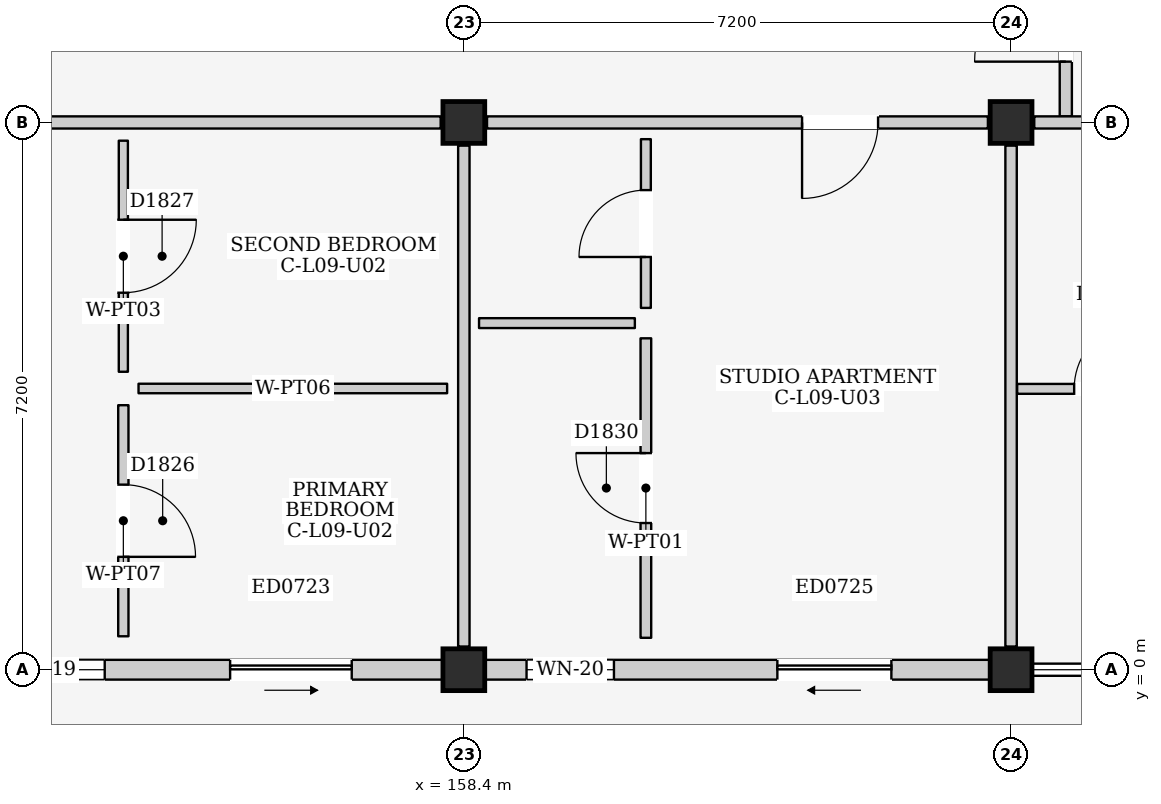
"""IFC4 building model, lengths in metres.
Left out: names, types, materials, properties, quantities, classifications, styles, units other than length and angle.
Written with IfcOpenShell. Run it as: python <this file> out.ifc"""

import sys

from ifc_helpers import new_model, si_unit, direction, frame, frame_2d, origin, origin_2d, place, context, subcontext, project, spatial, rectangle, extrude, element, fill, save


model = new_model("IFC4")
c1 = context("Model", 3, precision=1e-05, world=origin(), true_north=direction((0.0, 1.0)))
c2 = subcontext(c1, "Body", "Model", "MODEL_VIEW")
j1 = project(units=[si_unit("LENGTHUNIT", "METRE"), si_unit("PLANEANGLEUNIT", "RADIAN")], contexts=[c1])
p1 = place(None, origin())
s1 = spatial("IfcSite", under=j1, at=p1, CompositionType="ELEMENT")
p2 = place(p1, origin())
s2 = spatial("IfcBuilding", under=s1, at=p2, CompositionType="ELEMENT")
p3 = place(p2, frame((0.0, 0.0, 31.5)))
s3 = spatial("IfcBuildingStorey", under=s2, at=p3, CompositionType="ELEMENT", Elevation=31.5)
for number, where, z_axis, x_axis in (
    (1, (158.4, 0.0, 0.0), (0.0, 0.0, 1.0), (1.0, 0.0, 0.0)),
    (2, (158.4, 7.2, 0.0), (0.0, 0.0, 1.0), (1.0, 0.0, 0.0)),
    (3, (165.6, 0.0, 0.0), (0.0, 0.0, 1.0), (1.0, 0.0, 0.0)),
    (4, (165.6, 7.2, 0.0), (0.0, 0.0, 1.0), (1.0, 0.0, 0.0)),
):
    element("IfcColumn", number, at=place(p3, frame(where, z_axis=z_axis, x_axis=x_axis)), inside=s3, PredefinedType="COLUMN", context=c2, shape_type="SweptSolid", body=[
        extrude(rectangle(XDim=0.55, YDim=0.55, at=origin_2d()), origin(), (0.0, 0.0, 1.0), 3.3),
    ])
p4 = place(p3, frame((151.475, 0.0, 0.0), z_axis=(0.0, 0.0, 1.0), x_axis=(1.0, 0.0, 0.0)))
e5 = element("IfcWall", 5, at=p4, inside=s3, PredefinedType="ELEMENTEDWALL", context=c2, shape_type="SweptSolid", body=[
    extrude(rectangle(XDim=6.65, YDim=0.26, at=frame_2d((3.325, 0.0))), origin(), (0.0, 0.0, 1.0), 2.615),
])
p5 = place(p4, frame((3.85, 0.0, 0.0)))
e6 = element("IfcOpeningElement", 6, at=p5, cuts=e5, PredefinedType="OPENING", context=c2, shape_type="SweptSolid", body=[
    extrude(rectangle(XDim=1.6, YDim=2.12, at=frame_2d((0.8, 1.06))), frame((0.0, 0.145, 0.0), z_axis=(0.0, -1.0, 0.0), x_axis=(1.0, 0.0, 0.0)), (0.0, 0.0, 1.0), 0.29),
])
p6 = place(p4, frame((0.55, 0.0, 0.9)))
e7 = element("IfcOpeningElement", 7, at=p6, cuts=e5, PredefinedType="OPENING", context=c2, shape_type="SweptSolid", body=[
    extrude(rectangle(XDim=1.65, YDim=1.35, at=frame_2d((0.825, 0.675))), frame((0.0, 0.145, 0.0), z_axis=(0.0, -1.0, 0.0), x_axis=(1.0, 0.0, 0.0)), (0.0, 0.0, 1.0), 0.29),
])
p7 = place(p3, frame((158.675, 0.0, 0.0), z_axis=(0.0, 0.0, 1.0), x_axis=(1.0, 0.0, 0.0)))
e8 = element("IfcWall", 8, at=p7, inside=s3, PredefinedType="ELEMENTEDWALL", context=c2, shape_type="SweptSolid", body=[
    extrude(rectangle(XDim=6.65, YDim=0.26, at=frame_2d((3.325, 0.0))), origin(), (0.0, 0.0, 1.0), 2.615),
])
p8 = place(p7, frame((3.85, 0.0, 0.0)))
e9 = element("IfcOpeningElement", 9, at=p8, cuts=e8, PredefinedType="OPENING", context=c2, shape_type="SweptSolid", body=[
    extrude(rectangle(XDim=1.5, YDim=2.12, at=frame_2d((0.75, 1.06))), frame((0.0, 0.145, 0.0), z_axis=(0.0, -1.0, 0.0), x_axis=(1.0, 0.0, 0.0)), (0.0, 0.0, 1.0), 0.29),
])
p9 = place(p7, frame((0.55, 0.0, 0.9)))
e10 = element("IfcOpeningElement", 10, at=p9, cuts=e8, PredefinedType="OPENING", context=c2, shape_type="SweptSolid", body=[
    extrude(rectangle(XDim=1.15, YDim=1.15, at=frame_2d((0.575, 0.575))), frame((0.0, 0.145, 0.0), z_axis=(0.0, -1.0, 0.0), x_axis=(1.0, 0.0, 0.0)), (0.0, 0.0, 1.0), 0.29),
])
p10 = place(p3, frame((166.32, 7.28, 0.0), z_axis=(0.0, 0.0, 1.0), x_axis=(0.0, 1.0, 0.0)))
e11 = element("IfcWall", 11, at=p10, inside=s3, PredefinedType="PARTITIONING", context=c2, shape_type="SweptSolid", body=[
    extrude(rectangle(XDim=4.32, YDim=0.16, at=frame_2d((2.16, 0.0))), origin(), (0.0, 0.0, 1.0), 3.08),
])
p11 = place(p10, frame((0.72, 0.0, 0.0)))
e12 = element("IfcOpeningElement", 12, at=p11, cuts=e11, PredefinedType="OPENING", context=c2, shape_type="SweptSolid", body=[
    extrude(rectangle(XDim=1.2, YDim=2.2, at=frame_2d((0.6, 1.1))), frame((0.0, 0.095, 0.0), z_axis=(0.0, -1.0, 0.0), x_axis=(1.0, 0.0, 0.0)), (0.0, 0.0, 1.0), 0.19),
])
p12 = place(p3, frame((151.505, 7.2, 0.0), z_axis=(0.0, 0.0, 1.0), x_axis=(1.0, 0.0, 0.0)))
e13 = element("IfcWall", 13, at=p12, inside=s3, PredefinedType="PARTITIONING", context=c2, shape_type="SweptSolid", body=[
    extrude(rectangle(XDim=6.59, YDim=0.16, at=frame_2d((3.295, 0.0))), origin(), (0.0, 0.0, 1.0), 2.465),
])
p13 = place(p12, frame((0.18, 0.0, 0.0)))
e14 = element("IfcOpeningElement", 14, at=p13, cuts=e13, PredefinedType="OPENING", context=c2, shape_type="SweptSolid", body=[
    extrude(rectangle(XDim=1.0, YDim=2.15, at=frame_2d((0.5, 1.075))), frame((0.0, 0.095, 0.0), z_axis=(0.0, -1.0, 0.0), x_axis=(1.0, 0.0, 0.0)), (0.0, 0.0, 1.0), 0.19),
])
p14 = place(p3, frame((158.4, 0.305, 0.0), z_axis=(0.0, 0.0, 1.0), x_axis=(0.0, 1.0, 0.0)))
e15 = element("IfcWall", 15, at=p14, inside=s3, PredefinedType="PARTITIONING", context=c2, shape_type="SweptSolid", body=[
    extrude(rectangle(XDim=6.59, YDim=0.15, at=frame_2d((3.295, 0.0))), origin(), (0.0, 0.0, 1.0), 2.565),
])
p15 = place(p3, frame((153.92, 0.44, 0.0), z_axis=(0.0, 0.0, 1.0), x_axis=(0.0, 1.0, 0.0)))
e16 = element("IfcWall", 16, at=p15, inside=s3, PredefinedType="PARTITIONING", context=c2, shape_type="SweptSolid", body=[
    extrude(rectangle(XDim=3.04, YDim=0.135, at=frame_2d((1.52, 0.0))), origin(), (0.0, 0.0, 1.0), 3.08),
])
p16 = place(p15, frame((1.045, 0.0, 0.0)))
e17 = element("IfcOpeningElement", 17, at=p16, cuts=e16, PredefinedType="OPENING", context=c2, shape_type="SweptSolid", body=[
    extrude(rectangle(XDim=0.95, YDim=2.15, at=frame_2d((0.475, 1.075))), frame((0.0, 0.083, 0.0), z_axis=(0.0, -1.0, 0.0), x_axis=(1.0, 0.0, 0.0)), (0.0, 0.0, 1.0), 0.165),
])
p17 = place(p3, frame((154.12, 3.7, 0.0), z_axis=(0.0, 0.0, 1.0), x_axis=(1.0, 0.0, 0.0)))
e18 = element("IfcWall", 18, at=p17, inside=s3, PredefinedType="PARTITIONING", context=c2, shape_type="SweptSolid", body=[
    extrude(rectangle(XDim=4.06, YDim=0.125, at=frame_2d((2.03, 0.0))), origin(), (0.0, 0.0, 1.0), 3.08),
])
p18 = place(p3, frame((153.92, 3.92, 0.0), z_axis=(0.0, 0.0, 1.0), x_axis=(0.0, 1.0, 0.0)))
e19 = element("IfcWall", 19, at=p18, inside=s3, PredefinedType="PARTITIONING", context=c2, shape_type="SweptSolid", body=[
    extrude(rectangle(XDim=3.04, YDim=0.12, at=frame_2d((1.52, 0.0))), origin(), (0.0, 0.0, 1.0), 3.08),
])
p19 = place(p18, frame((1.04, 0.0, 0.0)))
e20 = element("IfcOpeningElement", 20, at=p19, cuts=e19, PredefinedType="OPENING", context=c2, shape_type="SweptSolid", body=[
    extrude(rectangle(XDim=0.96, YDim=2.15, at=frame_2d((0.48, 1.075))), frame((0.0, 0.075, 0.0), z_axis=(0.0, -1.0, 0.0), x_axis=(1.0, 0.0, 0.0)), (0.0, 0.0, 1.0), 0.15),
])
p20 = place(p3, frame((158.705, 7.2, 0.0), z_axis=(0.0, 0.0, 1.0), x_axis=(1.0, 0.0, 0.0)))
e21 = element("IfcWall", 21, at=p20, inside=s3, PredefinedType="PARTITIONING", context=c2, shape_type="SweptSolid", body=[
    extrude(rectangle(XDim=6.59, YDim=0.16, at=frame_2d((3.295, 0.0))), origin(), (0.0, 0.0, 1.0), 2.465),
])
p21 = place(p20, frame((4.145, 0.0, 0.0)))
e22 = element("IfcOpeningElement", 22, at=p21, cuts=e21, PredefinedType="OPENING", context=c2, shape_type="SweptSolid", body=[
    extrude(rectangle(XDim=1.0, YDim=2.15, at=frame_2d((0.5, 1.075))), frame((0.0, 0.095, 0.0), z_axis=(0.0, -1.0, 0.0), x_axis=(1.0, 0.0, 0.0)), (0.0, 0.0, 1.0), 0.19),
])
p22 = place(p3, frame((165.6, 0.305, 0.0), z_axis=(0.0, 0.0, 1.0), x_axis=(0.0, 1.0, 0.0)))
e23 = element("IfcWall", 23, at=p22, inside=s3, PredefinedType="PARTITIONING", context=c2, shape_type="SweptSolid", body=[
    extrude(rectangle(XDim=6.59, YDim=0.15, at=frame_2d((3.295, 0.0))), origin(), (0.0, 0.0, 1.0), 2.565),
])
p23 = place(p3, frame((158.6, 4.56, 0.0), z_axis=(0.0, 0.0, 1.0), x_axis=(1.0, 0.0, 0.0)))
e24 = element("IfcWall", 24, at=p23, inside=s3, PredefinedType="PARTITIONING", context=c2, shape_type="SweptSolid", body=[
    extrude(rectangle(XDim=2.05, YDim=0.13, at=frame_2d((1.025, 0.0))), origin(), (0.0, 0.0, 1.0), 3.08),
])
p24 = place(p3, frame((160.795, 4.76, 0.0), z_axis=(0.0, 0.0, 1.0), x_axis=(0.0, 1.0, 0.0)))
e25 = element("IfcWall", 25, at=p24, inside=s3, PredefinedType="PARTITIONING", context=c2, shape_type="SweptSolid", body=[
    extrude(rectangle(XDim=2.22, YDim=0.13, at=frame_2d((1.11, 0.0))), origin(), (0.0, 0.0, 1.0), 3.08),
])
p25 = place(p24, frame((0.67, 0.0, 0.0)))
e26 = element("IfcOpeningElement", 26, at=p25, cuts=e25, PredefinedType="OPENING", context=c2, shape_type="SweptSolid", body=[
    extrude(rectangle(XDim=0.88, YDim=2.1, at=frame_2d((0.44, 1.05))), frame((0.0, 0.08, 0.0), z_axis=(0.0, -1.0, 0.0), x_axis=(1.0, 0.0, 0.0)), (0.0, 0.0, 1.0), 0.16),
])
p26 = place(p3, frame((160.795, 0.42, 0.0), z_axis=(0.0, 0.0, 1.0), x_axis=(0.0, 1.0, 0.0)))
e27 = element("IfcWall", 27, at=p26, inside=s3, PredefinedType="PARTITIONING", context=c2, shape_type="SweptSolid", body=[
    extrude(rectangle(XDim=3.94, YDim=0.14, at=frame_2d((1.97, 0.0))), origin(), (0.0, 0.0, 1.0), 3.08),
])
p27 = place(p26, frame((1.51, 0.0, 0.0)))
e28 = element("IfcOpeningElement", 28, at=p27, cuts=e27, PredefinedType="OPENING", context=c2, shape_type="SweptSolid", body=[
    extrude(rectangle(XDim=0.92, YDim=2.1, at=frame_2d((0.46, 1.05))), frame((0.0, 0.085, 0.0), z_axis=(0.0, -1.0, 0.0), x_axis=(1.0, 0.0, 0.0)), (0.0, 0.0, 1.0), 0.17),
])
p28 = place(p3, frame((165.905, 7.2, 0.0), z_axis=(0.0, 0.0, 1.0), x_axis=(1.0, 0.0, 0.0)))
e29 = element("IfcWall", 29, at=p28, inside=s3, PredefinedType="PARTITIONING", context=c2, shape_type="SweptSolid", body=[
    extrude(rectangle(XDim=6.59, YDim=0.16, at=frame_2d((3.295, 0.0))), origin(), (0.0, 0.0, 1.0), 2.465),
])
p29 = place(p3, frame((165.68, 3.695, 0.0), z_axis=(0.0, 0.0, 1.0), x_axis=(1.0, 0.0, 0.0)))
e30 = element("IfcWall", 30, at=p29, inside=s3, PredefinedType="PARTITIONING", context=c2, shape_type="SweptSolid", body=[
    extrude(rectangle(XDim=2.4, YDim=0.13, at=frame_2d((1.2, 0.0))), origin(), (0.0, 0.0, 1.0), 3.08),
])
p30 = place(p29, frame((0.75, 0.0, 0.0)))
e31 = element("IfcOpeningElement", 31, at=p30, cuts=e30, PredefinedType="OPENING", context=c2, shape_type="SweptSolid", body=[
    extrude(rectangle(XDim=0.9, YDim=2.1, at=frame_2d((0.45, 1.05))), frame((0.0, 0.08, 0.0), z_axis=(0.0, -1.0, 0.0), x_axis=(1.0, 0.0, 0.0)), (0.0, 0.0, 1.0), 0.16),
])
p31 = place(p5, frame((1.6, 0.0, 0.0), z_axis=(0.0, 0.0, 1.0), x_axis=(-1.0, 0.0, 0.0)))
e32 = element("IfcDoor", 32, at=p31, inside=s3, OperationType="SLIDING_TO_RIGHT", PredefinedType="DOOR", context=c2, shape_type="SweptSolid", body=[
    extrude(rectangle(XDim=1.6, YDim=2.12, at=frame_2d((0.8, 1.06))), frame((0.0, 0.025, 0.0), z_axis=(0.0, -1.0, 0.0), x_axis=(1.0, 0.0, 0.0)), (0.0, 0.0, 1.0), 0.05),
])
fill(e6, e32)
p32 = place(p6, origin())
e33 = element("IfcWindow", 33, at=p32, inside=s3, PartitioningType="DOUBLE_PANEL_VERTICAL", PredefinedType="WINDOW", context=c2, shape_type="SweptSolid", body=[
    extrude(rectangle(XDim=1.65, YDim=1.35, at=frame_2d((0.825, 0.675))), frame((0.0, 0.03, 0.0), z_axis=(0.0, -1.0, 0.0), x_axis=(1.0, 0.0, 0.0)), (0.0, 0.0, 1.0), 0.06),
])
fill(e7, e33)
p33 = place(p8, frame((1.5, 0.0, 0.0), z_axis=(0.0, 0.0, 1.0), x_axis=(-1.0, 0.0, 0.0)))
e34 = element("IfcDoor", 34, at=p33, inside=s3, OperationType="SLIDING_TO_LEFT", PredefinedType="DOOR", context=c2, shape_type="SweptSolid", body=[
    extrude(rectangle(XDim=1.5, YDim=2.12, at=frame_2d((0.75, 1.06))), frame((0.0, 0.025, 0.0), z_axis=(0.0, -1.0, 0.0), x_axis=(1.0, 0.0, 0.0)), (0.0, 0.0, 1.0), 0.05),
])
fill(e9, e34)
p34 = place(p9, origin())
e35 = element("IfcWindow", 35, at=p34, inside=s3, PartitioningType="SINGLE_PANEL", PredefinedType="WINDOW", context=c2, shape_type="SweptSolid", body=[
    extrude(rectangle(XDim=1.15, YDim=1.15, at=frame_2d((0.575, 0.575))), frame((0.0, 0.03, 0.0), z_axis=(0.0, -1.0, 0.0), x_axis=(1.0, 0.0, 0.0)), (0.0, 0.0, 1.0), 0.06),
])
fill(e10, e35)
p35 = place(p11, origin())
e36 = element("IfcDoor", 36, at=p35, inside=s3, OperationType="SINGLE_SWING_LEFT", PredefinedType="DOOR", context=c2, shape_type="SweptSolid", body=[
    extrude(rectangle(XDim=1.2, YDim=2.2, at=frame_2d((0.6, 1.1))), frame((0.0, 0.025, 0.0), z_axis=(0.0, -1.0, 0.0), x_axis=(1.0, 0.0, 0.0)), (0.0, 0.0, 1.0), 0.05),
])
fill(e12, e36)
p36 = place(p16, frame((0.95, 0.0, 0.0), z_axis=(0.0, 0.0, 1.0), x_axis=(-1.0, 0.0, 0.0)))
e37 = element("IfcDoor", 37, at=p36, inside=s3, OperationType="SINGLE_SWING_RIGHT", PredefinedType="DOOR", context=c2, shape_type="SweptSolid", body=[
    extrude(rectangle(XDim=0.95, YDim=2.15, at=frame_2d((0.475, 1.075))), frame((0.0, 0.025, 0.0), z_axis=(0.0, -1.0, 0.0), x_axis=(1.0, 0.0, 0.0)), (0.0, 0.0, 1.0), 0.05),
])
fill(e17, e37)
p37 = place(p19, frame((0.96, 0.0, 0.0), z_axis=(0.0, 0.0, 1.0), x_axis=(-1.0, 0.0, 0.0)))
e38 = element("IfcDoor", 38, at=p37, inside=s3, OperationType="SINGLE_SWING_LEFT", PredefinedType="DOOR", context=c2, shape_type="SweptSolid", body=[
    extrude(rectangle(XDim=0.96, YDim=2.15, at=frame_2d((0.48, 1.075))), frame((0.0, 0.025, 0.0), z_axis=(0.0, -1.0, 0.0), x_axis=(1.0, 0.0, 0.0)), (0.0, 0.0, 1.0), 0.05),
])
fill(e20, e38)
p38 = place(p21, frame((1.0, 0.0, 0.0), z_axis=(0.0, 0.0, 1.0), x_axis=(-1.0, 0.0, 0.0)))
e39 = element("IfcDoor", 39, at=p38, inside=s3, OperationType="SINGLE_SWING_RIGHT", PredefinedType="DOOR", context=c2, shape_type="SweptSolid", body=[
    extrude(rectangle(XDim=1.0, YDim=2.15, at=frame_2d((0.5, 1.075))), frame((0.0, 0.025, 0.0), z_axis=(0.0, -1.0, 0.0), x_axis=(1.0, 0.0, 0.0)), (0.0, 0.0, 1.0), 0.05),
])
fill(e22, e39)
p39 = place(p25, origin())
e40 = element("IfcDoor", 40, at=p39, inside=s3, OperationType="SINGLE_SWING_LEFT", PredefinedType="DOOR", context=c2, shape_type="SweptSolid", body=[
    extrude(rectangle(XDim=0.88, YDim=2.1, at=frame_2d((0.44, 1.05))), frame((0.0, 0.025, 0.0), z_axis=(0.0, -1.0, 0.0), x_axis=(1.0, 0.0, 0.0)), (0.0, 0.0, 1.0), 0.05),
])
fill(e26, e40)
p40 = place(p27, origin())
e41 = element("IfcDoor", 41, at=p40, inside=s3, OperationType="SINGLE_SWING_RIGHT", PredefinedType="DOOR", context=c2, shape_type="SweptSolid", body=[
    extrude(rectangle(XDim=0.92, YDim=2.1, at=frame_2d((0.46, 1.05))), frame((0.0, 0.025, 0.0), z_axis=(0.0, -1.0, 0.0), x_axis=(1.0, 0.0, 0.0)), (0.0, 0.0, 1.0), 0.05),
])
fill(e28, e41)
p41 = place(p30, origin())
e42 = element("IfcDoor", 42, at=p41, inside=s3, OperationType="SINGLE_SWING_RIGHT", PredefinedType="DOOR", context=c2, shape_type="SweptSolid", body=[
    extrude(rectangle(XDim=0.9, YDim=2.1, at=frame_2d((0.45, 1.05))), frame((0.0, 0.025, 0.0), z_axis=(0.0, -1.0, 0.0), x_axis=(1.0, 0.0, 0.0)), (0.0, 0.0, 1.0), 0.05),
])
fill(e31, e42)
save(model, sys.argv[1])
